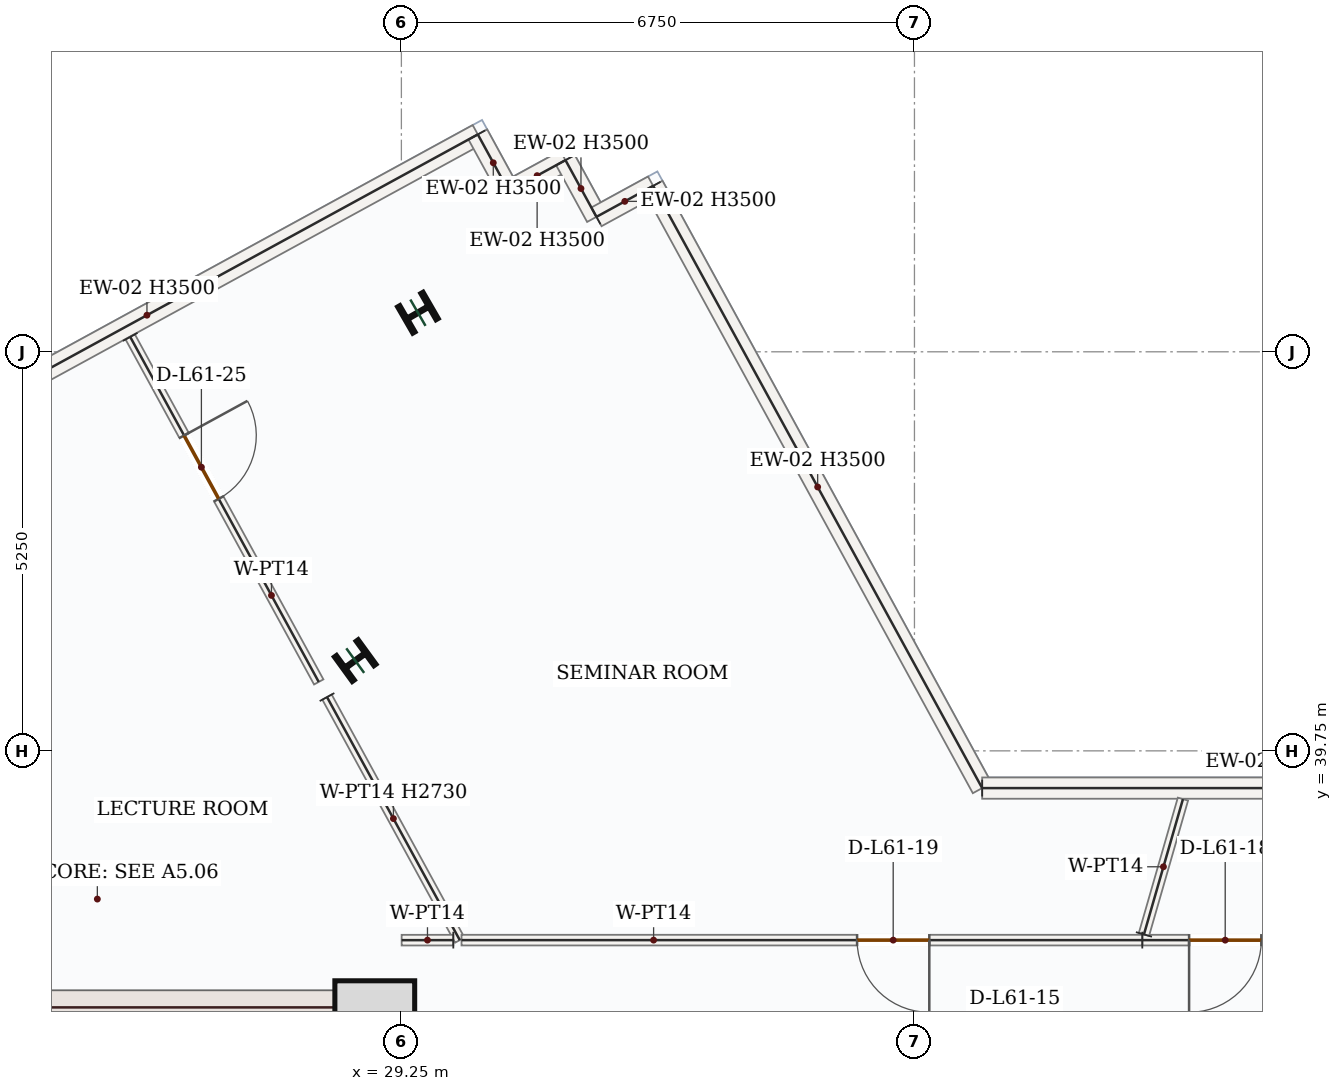
"""IFC4 building model, lengths in metres.
Left out: names, types, materials, properties, quantities, classifications, styles, units other than length and angle.
Written with IfcOpenShell. Run it as: python <this file> out.ifc"""

import sys

from ifc_helpers import new_model, si_unit, direction, frame, frame_2d, origin, origin_2d, place, context, subcontext, project, spatial, rectangle, i_section, extrude, source, transform, mapped, element, fill, save


model = new_model("IFC4")
c1 = context("Model", 3, precision=1e-05, world=origin(), true_north=direction((0.0, 1.0)))
c2 = subcontext(c1, "Body", "Model", "MODEL_VIEW")
j1 = project(units=[si_unit("LENGTHUNIT", "METRE"), si_unit("PLANEANGLEUNIT", "RADIAN")], contexts=[c1])
p1 = place(None, origin())
s1 = spatial("IfcSite", under=j1, at=p1, CompositionType="ELEMENT")
p2 = place(p1, origin())
s2 = spatial("IfcBuilding", under=s1, at=p2, CompositionType="ELEMENT")
p3 = place(p2, frame((0.0, 0.0, 257.85)))
s3 = spatial("IfcBuildingStorey", under=s2, at=p3, CompositionType="ELEMENT", Elevation=257.85)
p4 = place(p3, frame((29.025, 28.05, 0.0), z_axis=(0.0, 0.0, 1.0), x_axis=(0.0, 1.0, 0.0)))
e1 = element("IfcWall", 1, at=p4, inside=s3, PredefinedType="SHEAR", context=c2, shape_type="SweptSolid", body=[
    extrude(rectangle(XDim=8.55, YDim=0.45, at=frame_2d((4.275, 0.0))), origin(), (0.0, 0.0, 1.0), 3.5),
])
p5 = place(p4, frame((1.5, 0.0, 0.0)))
e2 = element("IfcOpeningElement", 2, at=p5, cuts=e1, PredefinedType="OPENING", context=c2, shape_type="SweptSolid", body=[
    extrude(rectangle(XDim=1.1, YDim=2.2, at=frame_2d((0.55, 1.1))), frame((0.0, 0.235, 0.0), z_axis=(0.0, -1.0, 0.0), x_axis=(1.0, 0.0, 0.0)), (0.0, 0.0, 1.0), 0.47),
])
m1 = source(origin(), c2, "Body", "SweptSolid", [
    extrude(rectangle(XDim=7.1, YDim=0.45, at=frame_2d((3.55, 0.0))), origin(), (0.0, 0.0, 1.0), 3.5),
])
p6 = place(p3, frame((21.7, 36.375, 0.0), z_axis=(0.0, 0.0, 1.0), x_axis=(1.0, 0.0, 0.0)))
e3 = element("IfcWall", 3, at=p6, inside=s3, PredefinedType="SHEAR", context=c2, shape_type="MappedRepresentation", body=[
    mapped(m1, transform((0.0, 0.0, 0.0), x_axis=(1.0, 0.0, 0.0), y_axis=(0.0, 1.0, 0.0), z_axis=(0.0, 0.0, 1.0), scale=1.0)),
])
m2 = source(origin(), c2, "Body", "SweptSolid", [
    extrude(rectangle(XDim=1.05, YDim=1.05, at=origin_2d()), origin(), (0.0, 0.0, 1.0), 3.75),
])
p7 = place(p3, frame((28.9, 36.2, 0.0), z_axis=(0.0, 0.0, 1.0), x_axis=(1.0, 0.0, 0.0)))
e4 = element("IfcColumn", 4, at=p7, inside=s3, PredefinedType="COLUMN", context=c2, shape_type="MappedRepresentation", body=[
    mapped(m2, transform((0.0, 0.0, 0.0), x_axis=(1.0, 0.0, 0.0), y_axis=(0.0, 1.0, 0.0), z_axis=(0.0, 0.0, 1.0), scale=1.0)),
])
m3 = source(origin(), c2, "Body", "SweptSolid", [
    extrude(i_section(OverallWidth=0.399, OverallDepth=0.386, WebThickness=0.021, FlangeThickness=0.033, FilletRadius=0.018, at=origin_2d()), origin(), (0.0, 0.0, 1.0), 3.75),
])
for number, where, z_axis, x_axis in (
    (5, (28.643, 40.937, 0.0), (0.0, 0.0, 1.0), (-0.588, 0.809, 0.0)),
    (6, (29.468, 45.514, 0.0), (0.0, 0.0, 1.0), (-0.5, 0.866, 0.0)),
):
    element("IfcColumn", number, at=place(p3, frame(where, z_axis=z_axis, x_axis=x_axis)), inside=s3, PredefinedType="COLUMN", context=c2, shape_type="MappedRepresentation", body=[
        mapped(m3, transform((0.0, 0.0, 0.0), x_axis=(1.0, 0.0, 0.0), y_axis=(0.0, 1.0, 0.0), z_axis=(0.0, 0.0, 1.0), scale=1.0)),
    ])
m4 = source(origin(), c2, "Body", "SweptSolid", [
    extrude(rectangle(XDim=9.92, YDim=0.28, at=frame_2d((4.96, 0.0))), origin(), (0.0, 0.0, 1.0), 3.5),
])
p8 = place(p3, frame((21.55, 43.104, 0.0), z_axis=(0.0, 0.0, 1.0), x_axis=(0.877572768104, 0.479443465574, 0.0)))
e7 = element("IfcWall", 7, at=p8, inside=s3, PredefinedType="SOLIDWALL", context=c2, shape_type="MappedRepresentation", body=[
    mapped(m4, transform((0.0, 0.0, 0.0), x_axis=(1.0, 0.0, 0.0), y_axis=(0.0, 1.0, 0.0), z_axis=(0.0, 0.0, 1.0), scale=1.0)),
])
m5 = source(origin(), c2, "Body", "SweptSolid", [
    extrude(rectangle(XDim=0.85, YDim=0.28, at=frame_2d((0.425, 0.0))), origin(), (0.0, 0.0, 1.0), 3.5),
])
for number, where, z_axis, x_axis in (
    (8, (30.255, 47.86, 0.0), (0.0, 0.0, 1.0), (0.479, -0.878, 0.0)),
    (9, (30.663, 47.114, 0.0), (0.0, 0.0, 1.0), (0.878, 0.479, 0.0)),
):
    element("IfcWall", number, at=place(p3, frame(where, z_axis=z_axis, x_axis=x_axis)), inside=s3, PredefinedType="SOLIDWALL", context=c2, shape_type="MappedRepresentation", body=[
        mapped(m5, transform((0.0, 0.0, 0.0), x_axis=(1.0, 0.0, 0.0), y_axis=(0.0, 1.0, 0.0), z_axis=(0.0, 0.0, 1.0), scale=1.0)),
    ])
m6 = source(origin(), c2, "Body", "SweptSolid", [
    extrude(rectangle(XDim=0.85, YDim=0.28, at=frame_2d((0.425, 0.0))), origin(), (0.0, 0.0, 1.0), 3.5),
])
p9 = place(p3, frame((31.409, 47.521, 0.0), z_axis=(0.0, 0.0, 1.0), x_axis=(0.479656876283, -0.877456141943, 0.0)))
e10 = element("IfcWall", 10, at=p9, inside=s3, PredefinedType="SOLIDWALL", context=c2, shape_type="MappedRepresentation", body=[
    mapped(m6, transform((0.0, 0.0, 0.0), x_axis=(1.0, 0.0, 0.0), y_axis=(0.0, 1.0, 0.0), z_axis=(0.0, 0.0, 1.0), scale=1.0)),
])
p10 = place(p3, frame((31.816, 46.775, 0.0), z_axis=(0.0, 0.0, 1.0), x_axis=(0.877577015132, 0.479435691737, 0.0)))
e11 = element("IfcWall", 11, at=p10, inside=s3, PredefinedType="SOLIDWALL", context=c2, shape_type="MappedRepresentation", body=[
    mapped(m5, transform((0.0, 0.0, 0.0), x_axis=(1.0, 0.0, 0.0), y_axis=(0.0, 1.0, 0.0), z_axis=(0.0, 0.0, 1.0), scale=1.0)),
])
m7 = source(origin(), c2, "Body", "SweptSolid", [
    extrude(rectangle(XDim=9.028, YDim=0.28, at=frame_2d((4.514, 0.0))), origin(), (0.0, 0.0, 1.0), 3.5),
])
p11 = place(p3, frame((32.562, 47.183, 0.0), z_axis=(0.0, 0.0, 1.0), x_axis=(0.479475345647, -0.877555350344, 0.0)))
e12 = element("IfcWall", 12, at=p11, inside=s3, PredefinedType="SOLIDWALL", context=c2, shape_type="MappedRepresentation", body=[
    mapped(m7, transform((0.0, 0.0, 0.0), x_axis=(1.0, 0.0, 0.0), y_axis=(0.0, 1.0, 0.0), z_axis=(0.0, 0.0, 1.0), scale=1.0)),
])
m8 = source(origin(), c2, "Body", "SweptSolid", [
    extrude(rectangle(XDim=7.658, YDim=0.28, at=frame_2d((3.829, 0.0))), origin(), (0.0, 0.0, 1.0), 2.772),
])
p12 = place(p3, frame((36.891, 39.26, 0.0), z_axis=(0.0, 0.0, 1.0), x_axis=(1.0, 0.0, 0.0)))
e13 = element("IfcWall", 13, at=p12, inside=s3, PredefinedType="SOLIDWALL", context=c2, shape_type="MappedRepresentation", body=[
    mapped(m8, transform((0.0, 0.0, 0.0), x_axis=(1.0, 0.0, 0.0), y_axis=(0.0, 1.0, 0.0), z_axis=(0.0, 0.0, 1.0), scale=1.0)),
])
p13 = place(p3, frame((42.747, 37.259, 0.0), z_axis=(0.0, 0.0, 1.0), x_axis=(-0.99999994699, 0.000325605609, 0.0)))
e14 = element("IfcWall", 14, at=p13, inside=s3, PredefinedType="PARTITIONING", context=c2, shape_type="SweptSolid", body=[
    extrude(rectangle(XDim=3.749, YDim=0.14, at=frame_2d((1.875, 0.0))), origin(), (0.0, 0.0, 1.0), 3.5),
])
p14 = place(p13, frame((2.183, 0.0, 0.0)))
e15 = element("IfcOpeningElement", 15, at=p14, cuts=e14, PredefinedType="OPENING", context=c2, shape_type="SweptSolid", body=[
    extrude(rectangle(XDim=0.95, YDim=2.15, at=frame_2d((0.475, 1.075))), frame((0.0, 0.08, 0.0), z_axis=(0.0, -1.0, 0.0), x_axis=(1.0, 0.0, 0.0)), (0.0, 0.0, 1.0), 0.16),
])
m9 = source(origin(), c2, "Body", "SweptSolid", [
    extrude(rectangle(XDim=1.853, YDim=0.14, at=frame_2d((0.926, 0.0))), origin(), (0.0, 0.0, 1.0), 3.5),
])
p15 = place(p3, frame((39.019, 37.335, 0.0), z_axis=(0.0, 0.0, 1.0), x_axis=(0.276896245691, 0.960899822626, 0.0)))
e16 = element("IfcWall", 16, at=p15, inside=s3, PredefinedType="PARTITIONING", context=c2, shape_type="MappedRepresentation", body=[
    mapped(m9, transform((0.0, 0.0, 0.0), x_axis=(1.0, 0.0, 0.0), y_axis=(0.0, 1.0, 0.0), z_axis=(0.0, 0.0, 1.0), scale=1.0)),
])
p16 = place(p3, frame((25.683, 45.196, 0.0), z_axis=(0.0, 0.0, 1.0), x_axis=(0.479427410708, -0.877581539153, 0.0)))
e17 = element("IfcWall", 17, at=p16, inside=s3, PredefinedType="PARTITIONING", context=c2, shape_type="SweptSolid", body=[
    extrude(rectangle(XDim=5.173, YDim=0.14, at=frame_2d((2.586, 0.0))), origin(), (0.0, 0.0, 1.0), 3.5),
])
p17 = place(p16, frame((1.478, 0.0, 0.0)))
e18 = element("IfcOpeningElement", 18, at=p17, cuts=e17, PredefinedType="OPENING", context=c2, shape_type="SweptSolid", body=[
    extrude(rectangle(XDim=0.95, YDim=2.15, at=frame_2d((0.475, 1.075))), frame((0.0, 0.08, 0.0), z_axis=(0.0, -1.0, 0.0), x_axis=(1.0, 0.0, 0.0)), (0.0, 0.0, 1.0), 0.16),
])
m10 = source(origin(), c2, "Body", "SweptSolid", [
    extrude(rectangle(XDim=3.644, YDim=0.14, at=frame_2d((1.822, 0.0))), origin(), (0.0, 0.0, 1.0), 2.73),
])
p18 = place(p3, frame((28.271, 40.457, 0.0), z_axis=(0.0, 0.0, 1.0), x_axis=(0.479509272429, -0.877536812706, 0.0)))
e19 = element("IfcWall", 19, at=p18, inside=s3, PredefinedType="PARTITIONING", context=c2, shape_type="MappedRepresentation", body=[
    mapped(m10, transform((0.0, 0.0, 0.0), x_axis=(1.0, 0.0, 0.0), y_axis=(0.0, 1.0, 0.0), z_axis=(0.0, 0.0, 1.0), scale=1.0)),
])
m11 = source(origin(), c2, "Body", "SweptSolid", [
    extrude(rectangle(XDim=0.68, YDim=0.14, at=frame_2d((0.34, 0.0))), origin(), (0.0, 0.0, 1.0), 3.5),
])
p19 = place(p3, frame((29.933, 37.26, 0.0), z_axis=(0.0, 0.0, 1.0), x_axis=(-0.999999741957, -0.000718390619, 0.0)))
e20 = element("IfcWall", 20, at=p19, inside=s3, PredefinedType="PARTITIONING", context=c2, shape_type="MappedRepresentation", body=[
    mapped(m11, transform((0.0, 0.0, 0.0), x_axis=(1.0, 0.0, 0.0), y_axis=(0.0, 1.0, 0.0), z_axis=(0.0, 0.0, 1.0), scale=1.0)),
])
p20 = place(p3, frame((38.998, 37.26, 0.0), z_axis=(0.0, 0.0, 1.0), x_axis=(-1.0, 0.0, 0.0)))
e21 = element("IfcWall", 21, at=p20, inside=s3, PredefinedType="PARTITIONING", context=c2, shape_type="SweptSolid", body=[
    extrude(rectangle(XDim=8.956, YDim=0.14, at=frame_2d((4.478, 0.0))), origin(), (0.0, 0.0, 1.0), 3.5),
])
p21 = place(p20, frame((2.802, 0.0, 0.0)))
e22 = element("IfcOpeningElement", 22, at=p21, cuts=e21, PredefinedType="OPENING", context=c2, shape_type="SweptSolid", body=[
    extrude(rectangle(XDim=0.95, YDim=2.15, at=frame_2d((0.475, 1.075))), frame((0.0, 0.08, 0.0), z_axis=(0.0, -1.0, 0.0), x_axis=(1.0, 0.0, 0.0)), (0.0, 0.0, 1.0), 0.16),
])
m12 = source(origin(), c2, "Body", "SweptSolid", [
    extrude(rectangle(XDim=0.95, YDim=2.15, at=frame_2d((0.475, 1.075))), frame((0.0, 0.025, 0.0), z_axis=(0.0, -1.0, 0.0), x_axis=(1.0, 0.0, 0.0)), (0.0, 0.0, 1.0), 0.05),
])
p22 = place(p14, origin())
e23 = element("IfcDoor", 23, at=p22, inside=s3, OperationType="SINGLE_SWING_RIGHT", PredefinedType="DOOR", context=c2, shape_type="MappedRepresentation", body=[
    mapped(m12, transform((0.0, 0.0, 0.0), x_axis=(1.0, 0.0, 0.0), y_axis=(0.0, 1.0, 0.0), z_axis=(0.0, 0.0, 1.0), scale=1.0)),
])
fill(e15, e23)
p23 = place(p21, origin())
e24 = element("IfcDoor", 24, at=p23, inside=s3, OperationType="SINGLE_SWING_LEFT", PredefinedType="DOOR", context=c2, shape_type="MappedRepresentation", body=[
    mapped(m12, transform((0.0, 0.0, 0.0), x_axis=(1.0, 0.0, 0.0), y_axis=(0.0, 1.0, 0.0), z_axis=(0.0, 0.0, 1.0), scale=1.0)),
])
fill(e22, e24)
p24 = place(p17, origin())
e25 = element("IfcDoor", 25, at=p24, inside=s3, OperationType="SINGLE_SWING_LEFT", PredefinedType="DOOR", context=c2, shape_type="MappedRepresentation", body=[
    mapped(m12, transform((0.0, 0.0, 0.0), x_axis=(1.0, 0.0, 0.0), y_axis=(0.0, 1.0, 0.0), z_axis=(0.0, 0.0, 1.0), scale=1.0)),
])
fill(e18, e25)
save(model, sys.argv[1])
